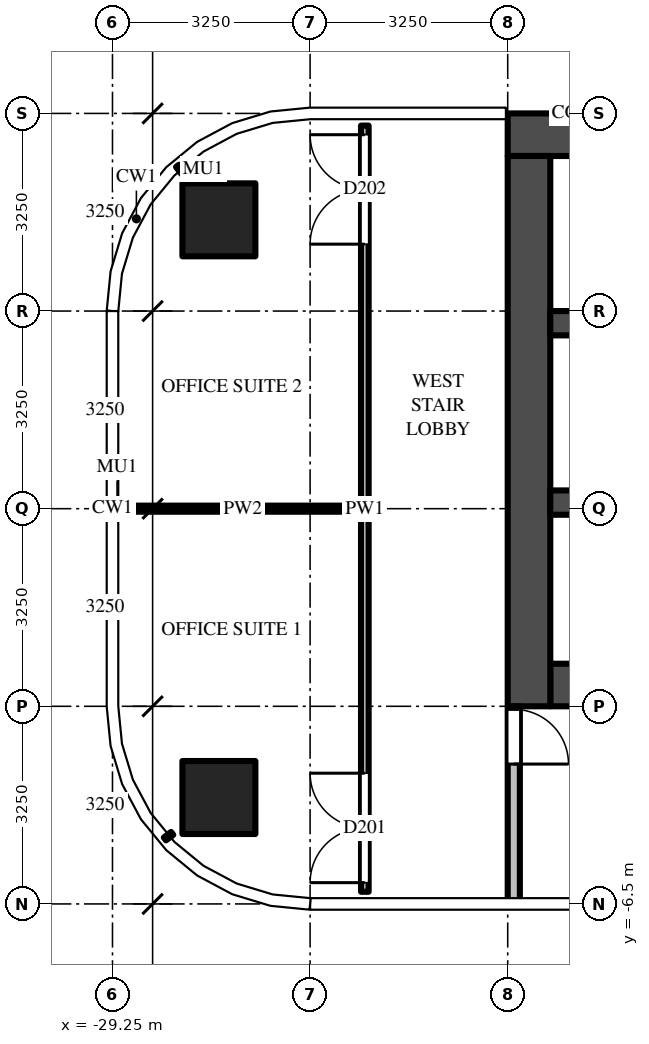
"""IFC4 building model, lengths in metres.
Left out: names, types, materials, properties, quantities, classifications, styles, units other than length and angle.
Written with IfcOpenShell. Run it as: python <this file> out.ifc"""

import sys

from ifc_helpers import new_model, si_unit, direction, frame, frame_2d, origin, origin_2d, place, context, subcontext, project, spatial, rectangle, extrude, source, transform, mapped, element, fill, save


model = new_model("IFC4")
c1 = context("Model", 3, precision=1e-05, world=origin(), true_north=direction((0.0, 1.0)))
c2 = subcontext(c1, "Body", "Model", "MODEL_VIEW")
j1 = project(units=[si_unit("LENGTHUNIT", "METRE"), si_unit("PLANEANGLEUNIT", "RADIAN")], contexts=[c1])
p1 = place(None, origin())
s1 = spatial("IfcSite", under=j1, at=p1, CompositionType="ELEMENT")
p2 = place(p1, origin())
s2 = spatial("IfcBuilding", under=s1, at=p2, CompositionType="ELEMENT")
p3 = place(p2, frame((0.0, 0.0, 165.9)))
s3 = spatial("IfcBuildingStorey", under=s2, at=p3, CompositionType="ELEMENT", Elevation=165.9)
m1 = source(origin(), c2, "Body", "SweptSolid", [
    extrude(rectangle(XDim=1.2, YDim=1.2, at=origin_2d()), origin(), (0.0, 0.0, 1.0), 3.9),
])
for number, where, z_axis, x_axis in (
    (1, (-27.5, -4.75, 0.0), (0.0, 0.0, 1.0), (1.0, 0.0, 0.0)),
    (2, (-27.5, 4.75, 0.0), (0.0, 0.0, 1.0), (1.0, 0.0, 0.0)),
):
    element("IfcColumn", number, at=place(p3, frame(where, z_axis=z_axis, x_axis=x_axis)), inside=s3, PredefinedType="COLUMN", context=c2, shape_type="MappedRepresentation", body=[
        mapped(m1, transform((0.0, 0.0, 0.0))),
    ])
m2 = source(origin(), c2, "Body", "SweptSolid", [
    extrude(rectangle(XDim=16.55, YDim=0.7, at=frame_2d((8.275, 0.0))), origin(), (0.0, 0.0, 1.0), 3.7),
])
p4 = place(p3, frame((-6.2, 6.15, 0.0), z_axis=(0.0, 0.0, 1.0), x_axis=(-1.0, 0.0, 0.0)))
e3 = element("IfcWall", 3, at=p4, inside=s3, PredefinedType="SHEAR", context=c2, shape_type="MappedRepresentation", body=[
    mapped(m2, transform((0.0, 0.0, 0.0))),
])
m3 = source(origin(), c2, "Body", "SweptSolid", [
    extrude(rectangle(XDim=14.85, YDim=0.7, at=frame_2d((7.425, 0.0))), origin(), (0.0, 0.0, 1.0), 3.7),
])
p5 = place(p3, frame((-7.2, -2.9, 0.0), z_axis=(0.0, 0.0, 1.0), x_axis=(-1.0, 0.0, 0.0)))
e4 = element("IfcWall", 4, at=p5, inside=s3, PredefinedType="SHEAR", context=c2, shape_type="MappedRepresentation", body=[
    mapped(m3, transform((0.0, 0.0, 0.0))),
])
m4 = source(origin(), c2, "Body", "SweptSolid", [
    extrude(rectangle(XDim=1.1, YDim=2.1, at=frame_2d((0.55, 1.05))), frame((0.0, 0.36, 0.0), z_axis=(0.0, -1.0, 0.0), x_axis=(1.0, 0.0, 0.0)), (0.0, 0.0, 1.0), 0.72),
])
p6 = place(p5, frame((0.55, 0.0, 0.0)))
e5 = element("IfcOpeningElement", 5, at=p6, cuts=e4, PredefinedType="OPENING", context=c2, shape_type="MappedRepresentation", body=[
    mapped(m4, transform((0.0, 0.0, 0.0))),
])
p7 = place(p5, frame((3.15, 0.0, 0.0)))
e6 = element("IfcOpeningElement", 6, at=p7, cuts=e4, PredefinedType="OPENING", context=c2, shape_type="MappedRepresentation", body=[
    mapped(m4, transform((0.0, 0.0, 0.0))),
])
m5 = source(origin(), c2, "Body", "SweptSolid", [
    extrude(rectangle(XDim=1.2, YDim=2.1, at=frame_2d((0.6, 1.05))), frame((0.0, 0.36, 0.0), z_axis=(0.0, -1.0, 0.0), x_axis=(1.0, 0.0, 0.0)), (0.0, 0.0, 1.0), 0.72),
])
p8 = place(p5, frame((5.7, 0.0, 0.0)))
e7 = element("IfcOpeningElement", 7, at=p8, cuts=e4, PredefinedType="OPENING", context=c2, shape_type="MappedRepresentation", body=[
    mapped(m5, transform((0.0, 0.0, 0.0))),
])
m6 = source(origin(), c2, "Body", "SweptSolid", [
    extrude(rectangle(XDim=1.3, YDim=2.1, at=frame_2d((0.65, 1.05))), frame((0.0, 0.36, 0.0), z_axis=(0.0, -1.0, 0.0), x_axis=(1.0, 0.0, 0.0)), (0.0, 0.0, 1.0), 0.72),
])
p9 = place(p5, frame((12.2, 0.0, 0.0)))
e8 = element("IfcOpeningElement", 8, at=p9, cuts=e4, PredefinedType="OPENING", context=c2, shape_type="MappedRepresentation", body=[
    mapped(m6, transform((0.0, 0.0, 0.0))),
])
p10 = place(p5, frame((9.85, 0.0, 0.0)))
e9 = element("IfcOpeningElement", 9, at=p10, cuts=e4, PredefinedType="OPENING", context=c2, shape_type="MappedRepresentation", body=[
    mapped(m5, transform((0.0, 0.0, 0.0))),
])
m7 = source(origin(), c2, "Body", "SweptSolid", [
    extrude(rectangle(XDim=1.0, YDim=2.1, at=frame_2d((0.5, 1.05))), frame((0.0, 0.36, 0.0), z_axis=(0.0, -1.0, 0.0), x_axis=(1.0, 0.0, 0.0)), (0.0, 0.0, 1.0), 0.72),
])
p11 = place(p5, frame((7.9, 0.0, 0.0)))
e10 = element("IfcOpeningElement", 10, at=p11, cuts=e4, PredefinedType="OPENING", context=c2, shape_type="MappedRepresentation", body=[
    mapped(m7, transform((0.0, 0.0, 0.0))),
])
m8 = source(origin(), c2, "Body", "SweptSolid", [
    extrude(rectangle(XDim=9.05, YDim=0.7, at=frame_2d((4.525, 0.0))), origin(), (0.0, 0.0, 1.0), 3.7),
])
p12 = place(p3, frame((-22.4, 5.8, 0.0), z_axis=(0.0, 0.0, 1.0), x_axis=(0.0, -1.0, 0.0)))
e11 = element("IfcWall", 11, at=p12, inside=s3, PredefinedType="SHEAR", context=c2, shape_type="MappedRepresentation", body=[
    mapped(m8, transform((0.0, 0.0, 0.0))),
])
m9 = source(origin(), c2, "Body", "SweptSolid", [
    extrude(rectangle(XDim=14.85, YDim=0.4, at=frame_2d((7.425, 0.0))), origin(), (0.0, 0.0, 1.0), 3.7),
])
p13 = place(p3, frame((-7.2, 0.1, 0.0), z_axis=(0.0, 0.0, 1.0), x_axis=(-1.0, 0.0, 0.0)))
e12 = element("IfcWall", 12, at=p13, inside=s3, PredefinedType="SHEAR", context=c2, shape_type="MappedRepresentation", body=[
    mapped(m9, transform((0.0, 0.0, 0.0))),
])
m10 = source(origin(), c2, "Body", "SweptSolid", [
    extrude(rectangle(XDim=1.0, YDim=2.1, at=frame_2d((0.5, 1.05))), frame((0.0, 0.21, 0.0), z_axis=(0.0, -1.0, 0.0), x_axis=(1.0, 0.0, 0.0)), (0.0, 0.0, 1.0), 0.42),
])
p14 = place(p13, frame((7.9, 0.0, 0.0)))
e13 = element("IfcOpeningElement", 13, at=p14, cuts=e12, PredefinedType="OPENING", context=c2, shape_type="MappedRepresentation", body=[
    mapped(m10, transform((0.0, 0.0, 0.0))),
])
m11 = source(origin(), c2, "Body", "SweptSolid", [
    extrude(rectangle(XDim=5.7, YDim=0.4, at=frame_2d((2.85, 0.0))), origin(), (0.0, 0.0, 1.0), 3.7),
])
p15 = place(p3, frame((-16.35, 3.05, 0.0), z_axis=(0.0, 0.0, 1.0), x_axis=(-1.0, 0.0, 0.0)))
e14 = element("IfcWall", 14, at=p15, inside=s3, PredefinedType="SHEAR", context=c2, shape_type="MappedRepresentation", body=[
    mapped(m11, transform((0.0, 0.0, 0.0))),
])
m12 = source(origin(), c2, "Body", "SweptSolid", [
    extrude(rectangle(XDim=3.25, YDim=0.2, at=frame_2d((1.625, 0.0))), origin(), (0.0, 0.0, 1.0), 3.7),
])
p16 = place(p3, frame((-22.65, -3.25, 0.0), z_axis=(0.0, 0.0, 1.0), x_axis=(0.0, -1.0, 0.0)))
e15 = element("IfcWall", 15, at=p16, inside=s3, PredefinedType="PARTITIONING", context=c2, shape_type="MappedRepresentation", body=[
    mapped(m12, transform((0.0, 0.0, 0.0))),
])
m13 = source(origin(), c2, "Body", "SweptSolid", [
    extrude(rectangle(XDim=0.9, YDim=2.1, at=frame_2d((0.45, 1.05))), frame((0.0, 0.11, 0.0), z_axis=(0.0, -1.0, 0.0), x_axis=(1.0, 0.0, 0.0)), (0.0, 0.0, 1.0), 0.22),
])
p17 = place(p16, frame((0.05, 0.0, 0.0)))
e16 = element("IfcOpeningElement", 16, at=p17, cuts=e15, PredefinedType="OPENING", context=c2, shape_type="MappedRepresentation", body=[
    mapped(m13, transform((0.0, 0.0, 0.0))),
])
m14 = source(origin(), c2, "Body", "SweptSolid", [
    extrude(rectangle(XDim=12.6, YDim=0.125, at=frame_2d((6.3, 0.0))), origin(), (0.0, 0.0, 1.0), 2.78),
])
p18 = place(p3, frame((-25.1, -6.3, 0.0), z_axis=(0.0, 0.0, 1.0), x_axis=(0.0, 1.0, 0.0)))
e17 = element("IfcWall", 17, at=p18, inside=s3, PredefinedType="PARTITIONING", context=c2, shape_type="MappedRepresentation", body=[
    mapped(m14, transform((0.0, 0.0, 0.0))),
])
m15 = source(origin(), c2, "Body", "SweptSolid", [
    extrude(rectangle(XDim=1.8, YDim=2.1, at=frame_2d((0.9, 1.05))), frame((0.0, 0.073, 0.0), z_axis=(0.0, -1.0, 0.0), x_axis=(1.0, 0.0, 0.0)), (0.0, 0.0, 1.0), 0.145),
])
p19 = place(p18, frame((0.15, 0.0, 0.0)))
e18 = element("IfcOpeningElement", 18, at=p19, cuts=e17, PredefinedType="OPENING", context=c2, shape_type="MappedRepresentation", body=[
    mapped(m15, transform((0.0, 0.0, 0.0))),
])
p20 = place(p18, frame((10.65, 0.0, 0.0)))
e19 = element("IfcOpeningElement", 19, at=p20, cuts=e17, PredefinedType="OPENING", context=c2, shape_type="MappedRepresentation", body=[
    mapped(m15, transform((0.0, 0.0, 0.0))),
])
m16 = source(origin(), c2, "Body", "SweptSolid", [
    extrude(rectangle(XDim=3.887, YDim=0.1, at=frame_2d((1.944, 0.0))), origin(), (0.0, 0.0, 1.0), 2.78),
])
p21 = place(p3, frame((-29.05, 0.0, 0.0), z_axis=(0.0, 0.0, 1.0), x_axis=(1.0, 0.0, 0.0)))
e20 = element("IfcWall", 20, at=p21, inside=s3, PredefinedType="PARTITIONING", context=c2, shape_type="MappedRepresentation", body=[
    mapped(m16, transform((0.0, 0.0, 0.0))),
])
m17 = source(origin(), c2, "Body", "SweptSolid", [
    extrude(rectangle(XDim=0.9, YDim=2.1, at=frame_2d((0.45, 1.05))), frame((0.0, 0.025, 0.0), z_axis=(0.0, -1.0, 0.0), x_axis=(1.0, 0.0, 0.0)), (0.0, 0.0, 1.0), 0.05),
])
p22 = place(p17, origin())
e21 = element("IfcDoor", 21, at=p22, inside=s3, OperationType="SINGLE_SWING_RIGHT", PredefinedType="DOOR", context=c2, shape_type="MappedRepresentation", body=[
    mapped(m17, transform((0.0, 0.0, 0.0))),
])
fill(e16, e21)
m18 = source(origin(), c2, "Body", "SweptSolid", [
    extrude(rectangle(XDim=1.8, YDim=2.1, at=frame_2d((0.9, 1.05))), frame((0.0, 0.025, 0.0), z_axis=(0.0, -1.0, 0.0), x_axis=(1.0, 0.0, 0.0)), (0.0, 0.0, 1.0), 0.05),
])
p23 = place(p19, origin())
e22 = element("IfcDoor", 22, at=p23, inside=s3, OperationType="DOUBLE_DOOR_SINGLE_SWING", PredefinedType="DOOR", context=c2, shape_type="MappedRepresentation", body=[
    mapped(m18, transform((0.0, 0.0, 0.0))),
])
fill(e18, e22)
p24 = place(p20, origin())
e23 = element("IfcDoor", 23, at=p24, inside=s3, OperationType="DOUBLE_DOOR_SINGLE_SWING", PredefinedType="DOOR", context=c2, shape_type="MappedRepresentation", body=[
    mapped(m18, transform((0.0, 0.0, 0.0))),
])
fill(e19, e23)
save(model, sys.argv[1])
